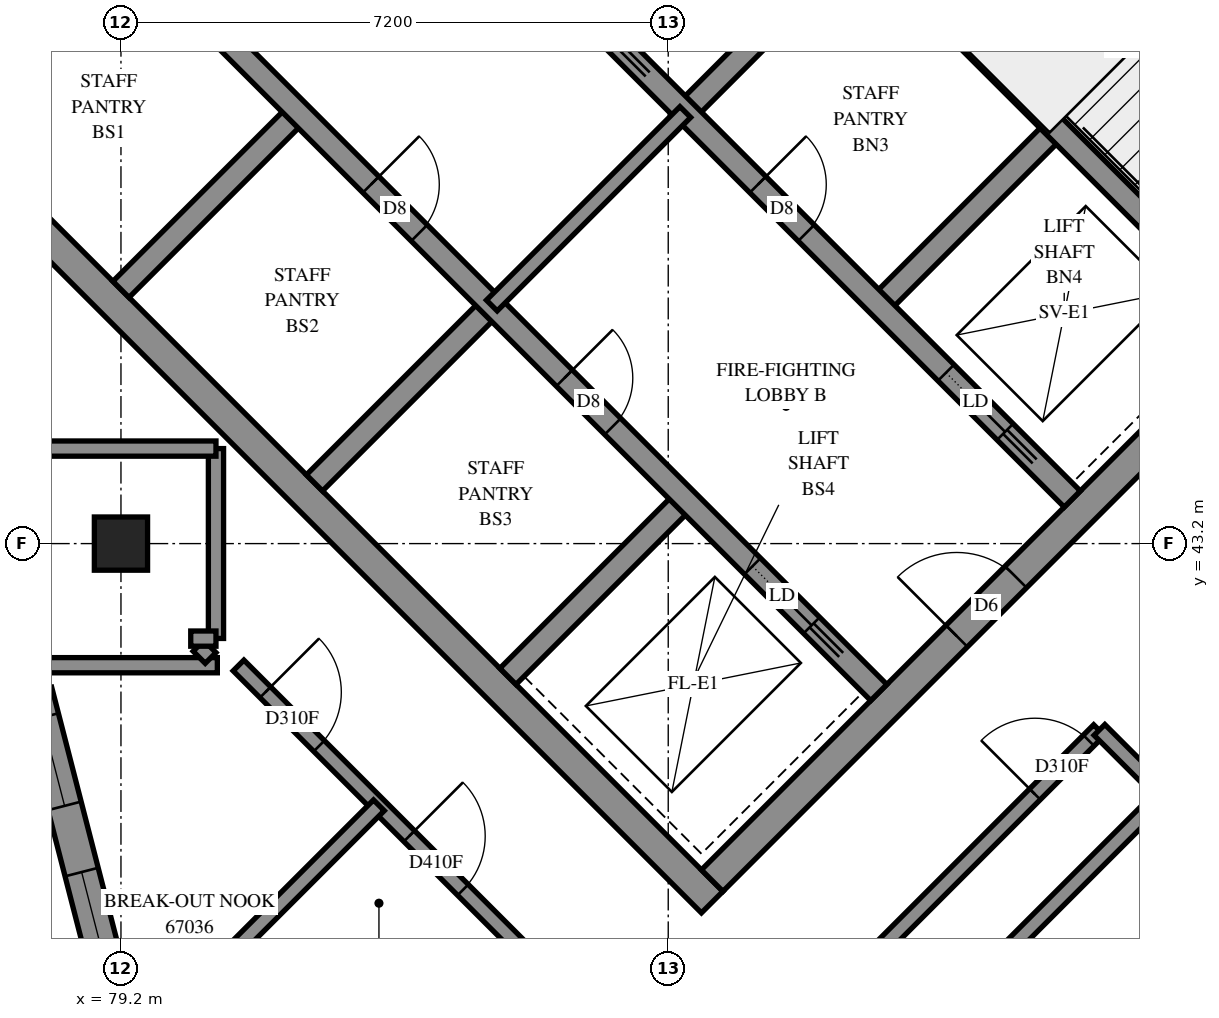
"""IFC4 building model, lengths in metres.
Left out: names, types, materials, properties, quantities, classifications, styles, units other than length and angle.
Written with IfcOpenShell. Run it as: python <this file> out.ifc"""

import sys

from ifc_helpers import new_model, si_unit, direction, frame, frame_2d, origin, origin_2d, place, context, subcontext, project, spatial, polyline, rectangle, outline, extrude, element, fill, save


model = new_model("IFC4")
c1 = context("Model", 3, precision=1e-05, world=origin(), true_north=direction((0.0, 1.0)))
c2 = subcontext(c1, "Body", "Model", "MODEL_VIEW")
j1 = project(units=[si_unit("LENGTHUNIT", "METRE"), si_unit("PLANEANGLEUNIT", "RADIAN")], contexts=[c1])
p1 = place(None, origin())
s1 = spatial("IfcSite", under=j1, at=p1, CompositionType="ELEMENT")
p2 = place(p1, origin())
s2 = spatial("IfcBuilding", under=s1, at=p2, CompositionType="ELEMENT")
p3 = place(p2, frame((0.0, 0.0, 247.2)))
s3 = spatial("IfcBuildingStorey", under=s2, at=p3, CompositionType="ELEMENT", Elevation=247.2)
p4 = place(p3, frame((79.2, 43.2, 0.0), z_axis=(0.0, 0.0, 1.0), x_axis=(1.0, 0.0, 0.0)))
e1 = element("IfcColumn", 1, at=p4, inside=s3, PredefinedType="COLUMN", context=c2, shape_type="SweptSolid", body=[
    extrude(rectangle(XDim=0.7, YDim=0.7, at=origin_2d()), origin(), (0.0, 0.0, 1.0), 3.1),
])
p5 = place(p3, frame((76.23, 49.231, -0.3), z_axis=(0.0, 0.0, 1.0), x_axis=(0.7071034917, -0.7071100706, 0.0)))
e2 = element("IfcWall", 2, at=p5, inside=s3, PredefinedType="SHEAR", context=c2, shape_type="SweptSolid", body=[
    extrude(rectangle(XDim=15.2, YDim=0.4, at=frame_2d((7.6, 0.0))), origin(), (0.0, 0.0, 1.0), 2.7),
])
p6 = place(p3, frame((86.695, 59.696, -0.3), z_axis=(0.0, 0.0, 1.0), x_axis=(0.7071100706, -0.7071034917, 0.0)))
e3 = element("IfcWall", 3, at=p6, inside=s3, PredefinedType="SHEAR", context=c2, shape_type="SweptSolid", body=[
    extrude(rectangle(XDim=15.2, YDim=0.4, at=frame_2d((7.6, 0.0))), origin(), (0.0, 0.0, 1.0), 2.7),
])
p7 = place(p6, frame((10.4, 0.0, 0.3)))
e4 = element("IfcOpeningElement", 4, at=p7, cuts=e3, PredefinedType="OPENING", context=c2, shape_type="SweptSolid", body=[
    extrude(rectangle(XDim=0.8, YDim=2.1, at=frame_2d((0.4, 1.05))), frame((0.0, 0.21, 0.0), z_axis=(0.0, -1.0, 0.0), x_axis=(1.0, 0.0, 0.0)), (0.0, 0.0, 1.0), 0.42),
])
p8 = place(p3, frame((76.513, 49.231, -0.3), z_axis=(0.0, 0.0, 1.0), x_axis=(0.7071067812, 0.7071067812, 0.0)))
e5 = element("IfcWall", 5, at=p8, inside=s3, PredefinedType="SHEAR", context=c2, shape_type="SweptSolid", body=[
    extrude(rectangle(XDim=14.4, YDim=0.4, at=frame_2d((7.2, 0.0))), origin(), (0.0, 0.0, 1.0), 2.7),
])
p9 = place(p8, frame((4.55, 0.0, 0.3)))
e6 = element("IfcOpeningElement", 6, at=p9, cuts=e5, PredefinedType="OPENING", context=c2, shape_type="SweptSolid", body=[
    extrude(rectangle(XDim=1.1, YDim=2.1, at=frame_2d((0.55, 1.05))), frame((0.0, 0.21, 0.0), z_axis=(0.0, -1.0, 0.0), x_axis=(1.0, 0.0, 0.0)), (0.0, 0.0, 1.0), 0.42),
])
p10 = place(p8, frame((11.35, 0.0, 0.3)))
e7 = element("IfcOpeningElement", 7, at=p10, cuts=e5, PredefinedType="OPENING", context=c2, shape_type="SweptSolid", body=[
    extrude(rectangle(XDim=1.1, YDim=2.1, at=frame_2d((0.55, 1.05))), frame((0.0, 0.21, 0.0), z_axis=(0.0, -1.0, 0.0), x_axis=(1.0, 0.0, 0.0)), (0.0, 0.0, 1.0), 0.42),
])
p11 = place(p3, frame((86.978, 38.766, -0.3), z_axis=(0.0, 0.0, 1.0), x_axis=(0.7071067812, 0.7071067812, 0.0)))
e8 = element("IfcWall", 8, at=p11, inside=s3, PredefinedType="SHEAR", context=c2, shape_type="SweptSolid", body=[
    extrude(rectangle(XDim=14.4, YDim=0.4, at=frame_2d((7.2, 0.0))), origin(), (0.0, 0.0, 1.0), 2.7),
])
p12 = place(p11, frame((4.55, 0.0, 0.3)))
e9 = element("IfcOpeningElement", 9, at=p12, cuts=e8, PredefinedType="OPENING", context=c2, shape_type="SweptSolid", body=[
    extrude(rectangle(XDim=1.1, YDim=2.1, at=frame_2d((0.55, 1.05))), frame((0.0, 0.21, 0.0), z_axis=(0.0, -1.0, 0.0), x_axis=(1.0, 0.0, 0.0)), (0.0, 0.0, 1.0), 0.42),
])
p13 = place(p11, frame((11.35, 0.0, 0.3)))
e10 = element("IfcOpeningElement", 10, at=p13, cuts=e8, PredefinedType="OPENING", context=c2, shape_type="SweptSolid", body=[
    extrude(rectangle(XDim=1.1, YDim=2.1, at=frame_2d((0.55, 1.05))), frame((0.0, 0.21, 0.0), z_axis=(0.0, -1.0, 0.0), x_axis=(1.0, 0.0, 0.0)), (0.0, 0.0, 1.0), 0.42),
])
p14 = place(p3, frame((79.2, 46.544, 0.0), z_axis=(0.0, 0.0, 1.0), x_axis=(0.7071219326, 0.7070916295, 0.0)))
e11 = element("IfcWall", 11, at=p14, inside=s3, PredefinedType="SOLIDWALL", context=c2, shape_type="SweptSolid", body=[
    extrude(rectangle(XDim=3.3, YDim=0.3, at=frame_2d((1.65, 0.0))), origin(), (0.0, 0.0, 1.0), 3.1),
])
p15 = place(p3, frame((81.746, 43.999, 0.0), z_axis=(0.0, 0.0, 1.0), x_axis=(0.7071067812, 0.7071067812, 0.0)))
e12 = element("IfcWall", 12, at=p15, inside=s3, PredefinedType="SOLIDWALL", context=c2, shape_type="SweptSolid", body=[
    extrude(rectangle(XDim=3.3, YDim=0.3, at=frame_2d((1.65, 0.0))), origin(), (0.0, 0.0, 1.0), 3.1),
])
p16 = place(p3, frame((86.625, 48.878, 0.0), z_axis=(0.0, 0.0, 1.0), x_axis=(0.7071067812, 0.7071067812, 0.0)))
e13 = element("IfcWall", 13, at=p16, inside=s3, PredefinedType="SOLIDWALL", context=c2, shape_type="SweptSolid", body=[
    extrude(rectangle(XDim=3.3, YDim=0.3, at=frame_2d((1.65, 0.0))), origin(), (0.0, 0.0, 1.0), 3.1),
])
p17 = place(p3, frame((84.291, 41.453, 0.0), z_axis=(0.0, 0.0, 1.0), x_axis=(0.7071067812, 0.7071067812, 0.0)))
e14 = element("IfcWall", 14, at=p17, inside=s3, PredefinedType="SOLIDWALL", context=c2, shape_type="SweptSolid", body=[
    extrude(rectangle(XDim=3.3, YDim=0.3, at=frame_2d((1.65, 0.0))), origin(), (0.0, 0.0, 1.0), 3.1),
])
p18 = place(p3, frame((89.17, 46.332, 0.0), z_axis=(0.0, 0.0, 1.0), x_axis=(0.7071067812, 0.7071067812, 0.0)))
e15 = element("IfcWall", 15, at=p18, inside=s3, PredefinedType="SOLIDWALL", context=c2, shape_type="SweptSolid", body=[
    extrude(rectangle(XDim=3.3, YDim=0.3, at=frame_2d((1.65, 0.0))), origin(), (0.0, 0.0, 1.0), 3.1),
])
p19 = place(p3, frame((78.988, 51.423, 0.0), z_axis=(0.0, 0.0, 1.0), x_axis=(0.7071067812, -0.7071067812, 0.0)))
e16 = element("IfcWall", 16, at=p19, inside=s3, PredefinedType="SOLIDWALL", context=c2, shape_type="SweptSolid", body=[
    extrude(rectangle(XDim=14.4, YDim=0.3, at=frame_2d((7.2, 0.0))), origin(), (0.0, 0.0, 1.0), 3.1),
])
p20 = place(p19, frame((1.35, 0.0, 0.0)))
e17 = element("IfcOpeningElement", 17, at=p20, cuts=e16, PredefinedType="OPENING", context=c2, shape_type="SweptSolid", body=[
    extrude(rectangle(XDim=0.9, YDim=2.1, at=frame_2d((0.45, 1.05))), frame((0.0, 0.16, 0.0), z_axis=(0.0, -1.0, 0.0), x_axis=(1.0, 0.0, 0.0)), (0.0, 0.0, 1.0), 0.32),
])
p21 = place(p19, frame((4.95, 0.0, 0.0)))
e18 = element("IfcOpeningElement", 18, at=p21, cuts=e16, PredefinedType="OPENING", context=c2, shape_type="SweptSolid", body=[
    extrude(rectangle(XDim=0.9, YDim=2.1, at=frame_2d((0.45, 1.05))), frame((0.0, 0.16, 0.0), z_axis=(0.0, -1.0, 0.0), x_axis=(1.0, 0.0, 0.0)), (0.0, 0.0, 1.0), 0.32),
])
p22 = place(p19, frame((8.55, 0.0, 0.0)))
e19 = element("IfcOpeningElement", 19, at=p22, cuts=e16, PredefinedType="OPENING", context=c2, shape_type="SweptSolid", body=[
    extrude(rectangle(XDim=0.9, YDim=2.1, at=frame_2d((0.45, 1.05))), frame((0.0, 0.16, 0.0), z_axis=(0.0, -1.0, 0.0), x_axis=(1.0, 0.0, 0.0)), (0.0, 0.0, 1.0), 0.32),
])
p23 = place(p19, frame((12.05, 0.0, 0.0)))
e20 = element("IfcOpeningElement", 20, at=p23, cuts=e16, PredefinedType="OPENING", context=c2, shape_type="SweptSolid", body=[
    extrude(rectangle(XDim=1.1, YDim=2.1, at=frame_2d((0.55, 1.05))), frame((0.0, 0.16, 0.0), z_axis=(0.0, -1.0, 0.0), x_axis=(1.0, 0.0, 0.0)), (0.0, 0.0, 1.0), 0.32),
])
p24 = place(p3, frame((81.534, 53.969, 0.0), z_axis=(0.0, 0.0, 1.0), x_axis=(0.707103309, -0.7071102534, 0.0)))
e21 = element("IfcWall", 21, at=p24, inside=s3, PredefinedType="SOLIDWALL", context=c2, shape_type="SweptSolid", body=[
    extrude(rectangle(XDim=14.4, YDim=0.3, at=frame_2d((7.2, 0.0))), origin(), (0.0, 0.0, 1.0), 3.1),
])
p25 = place(p24, frame((8.55, 0.0, 0.0)))
e22 = element("IfcOpeningElement", 22, at=p25, cuts=e21, PredefinedType="OPENING", context=c2, shape_type="SweptSolid", body=[
    extrude(rectangle(XDim=0.9, YDim=2.1, at=frame_2d((0.45, 1.05))), frame((0.0, 0.16, 0.0), z_axis=(0.0, -1.0, 0.0), x_axis=(1.0, 0.0, 0.0)), (0.0, 0.0, 1.0), 0.32),
])
p26 = place(p24, frame((1.25, 0.0, 0.0)))
e23 = element("IfcOpeningElement", 23, at=p26, cuts=e21, PredefinedType="OPENING", context=c2, shape_type="SweptSolid", body=[
    extrude(rectangle(XDim=1.1, YDim=2.1, at=frame_2d((0.55, 1.05))), frame((0.0, 0.16, 0.0), z_axis=(0.0, -1.0, 0.0), x_axis=(1.0, 0.0, 0.0)), (0.0, 0.0, 1.0), 0.32),
])
p27 = place(p24, frame((4.85, 0.0, 0.0)))
e24 = element("IfcOpeningElement", 24, at=p27, cuts=e21, PredefinedType="OPENING", context=c2, shape_type="SweptSolid", body=[
    extrude(rectangle(XDim=1.1, YDim=2.1, at=frame_2d((0.55, 1.05))), frame((0.0, 0.16, 0.0), z_axis=(0.0, -1.0, 0.0), x_axis=(1.0, 0.0, 0.0)), (0.0, 0.0, 1.0), 0.32),
])
p28 = place(p24, frame((12.05, 0.0, 0.0)))
e25 = element("IfcOpeningElement", 25, at=p28, cuts=e21, PredefinedType="OPENING", context=c2, shape_type="SweptSolid", body=[
    extrude(rectangle(XDim=1.1, YDim=2.1, at=frame_2d((0.55, 1.05))), frame((0.0, 0.16, 0.0), z_axis=(0.0, -1.0, 0.0), x_axis=(1.0, 0.0, 0.0)), (0.0, 0.0, 1.0), 0.32),
])
p29 = place(p3, frame((88.958, 51.211, 0.0), z_axis=(0.0, 0.0, 1.0), x_axis=(0.7070998367, -0.7071137256, 0.0)))
e26 = element("IfcWall", 26, at=p29, inside=s3, PredefinedType="SOLIDWALL", context=c2, shape_type="SweptSolid", body=[
    extrude(rectangle(XDim=7.2, YDim=0.3, at=frame_2d((3.6, 0.0))), origin(), (0.0, 0.0, 1.0), 3.1),
])
p30 = place(p3, frame((78.071, 41.255, 0.0), z_axis=(0.0, 0.0, 1.0), x_axis=(0.2493659813, -0.9684093181, 0.0)))
e27 = element("IfcWall", 27, at=p30, inside=s3, PredefinedType="SOLIDWALL", context=c2, shape_type="SweptSolid", body=[
    extrude(outline(polyline([(0.133, -0.225), (4.853, -0.225), (4.598, 0.225), (-0.133, 0.225), (0.133, -0.225)])), origin(), (0.0, 0.0, 1.0), 3.1),
])
p31 = place(p30, frame((0.354, 0.0, 0.45)))
e28 = element("IfcOpeningElement", 28, at=p31, cuts=e27, PredefinedType="OPENING", context=c2, shape_type="SweptSolid", body=[
    extrude(rectangle(XDim=1.2, YDim=2.55, at=frame_2d((0.6, 1.275))), frame((0.0, 0.235, 0.0), z_axis=(0.0, -1.0, 0.0), x_axis=(1.0, 0.0, 0.0)), (0.0, 0.0, 1.0), 0.47),
])
p32 = place(p30, frame((2.453, 0.0, 0.45)))
e29 = element("IfcOpeningElement", 29, at=p32, cuts=e27, PredefinedType="OPENING", context=c2, shape_type="SweptSolid", body=[
    extrude(rectangle(XDim=1.2, YDim=2.55, at=frame_2d((0.6, 1.275))), frame((0.0, 0.235, 0.0), z_axis=(0.0, -1.0, 0.0), x_axis=(1.0, 0.0, 0.0)), (0.0, 0.0, 1.0), 0.47),
])
p33 = place(p3, frame((91.313, 53.354, 0.0), z_axis=(0.0, 0.0, 1.0), x_axis=(0.7071067812, -0.7071067812, 0.0)))
e30 = element("IfcWall", 30, at=p33, inside=s3, PredefinedType="PARTITIONING", context=c2, shape_type="SweptSolid", body=[
    extrude(rectangle(XDim=5.65, YDim=0.15, at=frame_2d((2.825, 0.0))), origin(), (0.0, 0.0, 1.0), 3.1),
])
p34 = place(p3, frame((84.079, 46.332, 0.0), z_axis=(0.0, 0.0, 1.0), x_axis=(0.7071067812, 0.7071067812, 0.0)))
e31 = element("IfcWall", 31, at=p34, inside=s3, PredefinedType="PARTITIONING", context=c2, shape_type="SweptSolid", body=[
    extrude(rectangle(XDim=3.6, YDim=0.2, at=frame_2d((1.8, 0.0))), origin(), (0.0, 0.0, 1.0), 3.1),
])
p35 = place(p3, frame((84.934, 31.915, 0.0), z_axis=(0.0, 0.0, 1.0), x_axis=(0.7071067812, 0.7071067812, 0.0)))
e32 = element("IfcWall", 32, at=p35, inside=s3, PredefinedType="PARTITIONING", context=c2, shape_type="SweptSolid", body=[
    extrude(rectangle(XDim=11.29, YDim=0.2, at=frame_2d((5.645, 0.0))), origin(), (0.0, 0.0, 1.0), 3.1),
])
p36 = place(p3, frame((80.747, 41.597, 0.0), z_axis=(0.0, 0.0, 1.0), x_axis=(0.7071067812, -0.7071067812, 0.0)))
e33 = element("IfcWall", 33, at=p36, inside=s3, PredefinedType="PARTITIONING", context=c2, shape_type="SweptSolid", body=[
    extrude(rectangle(XDim=8.607, YDim=0.2, at=frame_2d((4.303, 0.0))), origin(), (0.0, 0.0, 1.0), 3.1),
])
p37 = place(p36, frame((0.498, 0.0, 0.0)))
e34 = element("IfcOpeningElement", 34, at=p37, cuts=e33, PredefinedType="OPENING", context=c2, shape_type="SweptSolid", body=[
    extrude(rectangle(XDim=1.0, YDim=2.1, at=frame_2d((0.5, 1.05))), frame((0.0, 0.11, 0.0), z_axis=(0.0, -1.0, 0.0), x_axis=(1.0, 0.0, 0.0)), (0.0, 0.0, 1.0), 0.22),
])
p38 = place(p36, frame((3.175, 0.0, 0.0)))
e35 = element("IfcOpeningElement", 35, at=p38, cuts=e33, PredefinedType="OPENING", context=c2, shape_type="SweptSolid", body=[
    extrude(rectangle(XDim=1.0, YDim=2.1, at=frame_2d((0.5, 1.05))), frame((0.0, 0.11, 0.0), z_axis=(0.0, -1.0, 0.0), x_axis=(1.0, 0.0, 0.0)), (0.0, 0.0, 1.0), 0.22),
])
p39 = place(p3, frame((86.836, 35.514, 0.0), z_axis=(0.0, 0.0, 1.0), x_axis=(0.7071067812, 0.7071067812, 0.0)))
e36 = element("IfcWall", 36, at=p39, inside=s3, PredefinedType="PARTITIONING", context=c2, shape_type="SweptSolid", body=[
    extrude(rectangle(XDim=7.399, YDim=0.2, at=frame_2d((3.7, 0.0))), origin(), (0.0, 0.0, 1.0), 3.1),
])
p40 = place(p39, frame((6.207, 0.0, 0.0)))
e37 = element("IfcOpeningElement", 37, at=p40, cuts=e36, PredefinedType="OPENING", context=c2, shape_type="SweptSolid", body=[
    extrude(rectangle(XDim=1.0, YDim=2.1, at=frame_2d((0.5, 1.05))), frame((0.0, 0.11, 0.0), z_axis=(0.0, -1.0, 0.0), x_axis=(1.0, 0.0, 0.0)), (0.0, 0.0, 1.0), 0.22),
])
p41 = place(p3, frame((92.073, 40.749, 0.0), z_axis=(0.0, 0.0, 1.0), x_axis=(0.7071067812, -0.7071067812, 0.0)))
e38 = element("IfcWall", 38, at=p41, inside=s3, PredefinedType="PARTITIONING", context=c2, shape_type="SweptSolid", body=[
    extrude(rectangle(XDim=4.8, YDim=0.2, at=frame_2d((2.4, 0.0))), origin(), (0.0, 0.0, 1.0), 3.1),
])
p42 = place(p41, frame((1.725, 0.0, 0.0)))
e39 = element("IfcOpeningElement", 39, at=p42, cuts=e38, PredefinedType="OPENING", context=c2, shape_type="SweptSolid", body=[
    extrude(rectangle(XDim=1.0, YDim=2.1, at=frame_2d((0.5, 1.05))), frame((0.0, 0.11, 0.0), z_axis=(0.0, -1.0, 0.0), x_axis=(1.0, 0.0, 0.0)), (0.0, 0.0, 1.0), 0.22),
])
p43 = place(p3, frame((79.635, 36.798, 0.0), z_axis=(0.0, 0.0, 1.0), x_axis=(0.7071187313, 0.7070948309, 0.0)))
e40 = element("IfcWall", 40, at=p43, inside=s3, PredefinedType="PARTITIONING", context=c2, shape_type="SweptSolid", body=[
    extrude(rectangle(XDim=4.184, YDim=0.2, at=frame_2d((2.092, 0.0))), origin(), (0.0, 0.0, 1.0), 3.1),
])
p44 = place(p3, frame((77.685, 41.6, 0.0), z_axis=(0.0, 0.0, 1.0), x_axis=(1.0, 0.0, 0.0)))
e41 = element("IfcWall", 41, at=p44, inside=s3, PredefinedType="PARTITIONING", context=c2, shape_type="SweptSolid", body=[
    extrude(rectangle(XDim=2.783, YDim=0.2, at=frame_2d((1.392, 0.0))), origin(), (0.0, 0.0, 1.0), 3.1),
])
for number, where, z_axis, x_axis in (
    (42, (80.45, 41.952, 0.0), (0.0, 0.0, 1.0), (0.0, 1.0, 0.0)),
    (43, (77.952, 44.45, 0.0), (0.0, 0.0, 1.0), (1.0, 0.0, 0.0)),
):
    element("IfcWall", number, at=place(p3, frame(where, z_axis=z_axis, x_axis=x_axis)), inside=s3, PredefinedType="PARTITIONING", context=c2, shape_type="SweptSolid", body=[
        extrude(rectangle(XDim=2.498, YDim=0.2, at=frame_2d((1.249, 0.0))), origin(), (0.0, 0.0, 1.0), 3.1),
    ])
p45 = place(p3, frame((80.221, 41.855, 0.0), z_axis=(0.0, 0.0, 1.0), x_axis=(0.7068844555, -0.707329037, 0.0)))
e44 = element("IfcWall", 44, at=p45, inside=s3, PredefinedType="PARTITIONING", context=c2, shape_type="SweptSolid", body=[
    extrude(rectangle(XDim=0.225, YDim=0.2, at=frame_2d((0.112, 0.0))), origin(), (0.0, 0.0, 1.0), 3.1),
])
p46 = place(p3, frame((80.118, 41.95, 0.0), z_axis=(0.0, 0.0, 1.0), x_axis=(1.0, 0.0, 0.0)))
e45 = element("IfcWall", 45, at=p46, inside=s3, PredefinedType="PARTITIONING", context=c2, shape_type="SweptSolid", body=[
    extrude(rectangle(XDim=0.332, YDim=0.2, at=frame_2d((0.166, 0.0))), origin(), (0.0, 0.0, 1.0), 3.1),
])
p47 = place(p31, origin())
e46 = element("IfcWindow", 46, at=p47, inside=s3, PartitioningType="SINGLE_PANEL", PredefinedType="WINDOW", context=c2, shape_type="SweptSolid", body=[
    extrude(rectangle(XDim=1.2, YDim=2.55, at=frame_2d((0.6, 1.275))), frame((0.0, 0.205, 0.0), z_axis=(0.0, -1.0, 0.0), x_axis=(1.0, 0.0, 0.0)), (0.0, 0.0, 1.0), 0.06),
])
fill(e28, e46)
p48 = place(p32, origin())
e47 = element("IfcWindow", 47, at=p48, inside=s3, PartitioningType="SINGLE_PANEL", PredefinedType="WINDOW", context=c2, shape_type="SweptSolid", body=[
    extrude(rectangle(XDim=1.2, YDim=2.55, at=frame_2d((0.6, 1.275))), frame((0.0, 0.205, 0.0), z_axis=(0.0, -1.0, 0.0), x_axis=(1.0, 0.0, 0.0)), (0.0, 0.0, 1.0), 0.06),
])
fill(e29, e47)
p49 = place(p12, origin())
e48 = element("IfcDoor", 48, at=p49, inside=s3, OperationType="DOUBLE_DOOR_SINGLE_SWING", PredefinedType="DOOR", context=c2, shape_type="SweptSolid", body=[
    extrude(rectangle(XDim=1.1, YDim=2.1, at=frame_2d((0.55, 1.05))), frame((0.0, 0.025, 0.0), z_axis=(0.0, -1.0, 0.0), x_axis=(1.0, 0.0, 0.0)), (0.0, 0.0, 1.0), 0.05),
])
fill(e9, e48)
p50 = place(p21, origin())
e49 = element("IfcDoor", 49, at=p50, inside=s3, OperationType="SINGLE_SWING_LEFT", PredefinedType="DOOR", context=c2, shape_type="SweptSolid", body=[
    extrude(rectangle(XDim=0.9, YDim=2.1, at=frame_2d((0.45, 1.05))), frame((0.0, 0.025, 0.0), z_axis=(0.0, -1.0, 0.0), x_axis=(1.0, 0.0, 0.0)), (0.0, 0.0, 1.0), 0.05),
])
fill(e18, e49)
p51 = place(p22, origin())
e50 = element("IfcDoor", 50, at=p51, inside=s3, OperationType="SINGLE_SWING_LEFT", PredefinedType="DOOR", context=c2, shape_type="SweptSolid", body=[
    extrude(rectangle(XDim=0.9, YDim=2.1, at=frame_2d((0.45, 1.05))), frame((0.0, 0.025, 0.0), z_axis=(0.0, -1.0, 0.0), x_axis=(1.0, 0.0, 0.0)), (0.0, 0.0, 1.0), 0.05),
])
fill(e19, e50)
p52 = place(p25, origin())
e51 = element("IfcDoor", 51, at=p52, inside=s3, OperationType="SINGLE_SWING_LEFT", PredefinedType="DOOR", context=c2, shape_type="SweptSolid", body=[
    extrude(rectangle(XDim=0.9, YDim=2.1, at=frame_2d((0.45, 1.05))), frame((0.0, 0.025, 0.0), z_axis=(0.0, -1.0, 0.0), x_axis=(1.0, 0.0, 0.0)), (0.0, 0.0, 1.0), 0.05),
])
fill(e22, e51)
p53 = place(p23, origin())
e52 = element("IfcDoor", 52, at=p53, inside=s3, OperationType="SLIDING_TO_RIGHT", PredefinedType="DOOR", context=c2, shape_type="SweptSolid", body=[
    extrude(rectangle(XDim=1.1, YDim=2.1, at=frame_2d((0.55, 1.05))), frame((0.0, 0.025, 0.0), z_axis=(0.0, -1.0, 0.0), x_axis=(1.0, 0.0, 0.0)), (0.0, 0.0, 1.0), 0.05),
])
fill(e20, e52)
p54 = place(p28, origin())
e53 = element("IfcDoor", 53, at=p54, inside=s3, OperationType="SLIDING_TO_RIGHT", PredefinedType="DOOR", context=c2, shape_type="SweptSolid", body=[
    extrude(rectangle(XDim=1.1, YDim=2.1, at=frame_2d((0.55, 1.05))), frame((0.0, 0.025, 0.0), z_axis=(0.0, -1.0, 0.0), x_axis=(1.0, 0.0, 0.0)), (0.0, 0.0, 1.0), 0.05),
])
fill(e25, e53)
p55 = place(p37, origin())
e54 = element("IfcDoor", 54, at=p55, inside=s3, OperationType="SINGLE_SWING_RIGHT", PredefinedType="DOOR", context=c2, shape_type="SweptSolid", body=[
    extrude(rectangle(XDim=1.0, YDim=2.1, at=frame_2d((0.5, 1.05))), frame((0.0, 0.025, 0.0), z_axis=(0.0, -1.0, 0.0), x_axis=(1.0, 0.0, 0.0)), (0.0, 0.0, 1.0), 0.05),
])
fill(e34, e54)
p56 = place(p38, origin())
e55 = element("IfcDoor", 55, at=p56, inside=s3, OperationType="SINGLE_SWING_LEFT", PredefinedType="DOOR", context=c2, shape_type="SweptSolid", body=[
    extrude(rectangle(XDim=1.0, YDim=2.1, at=frame_2d((0.5, 1.05))), frame((0.0, 0.025, 0.0), z_axis=(0.0, -1.0, 0.0), x_axis=(1.0, 0.0, 0.0)), (0.0, 0.0, 1.0), 0.05),
])
fill(e35, e55)
p57 = place(p40, origin())
e56 = element("IfcDoor", 56, at=p57, inside=s3, OperationType="SINGLE_SWING_RIGHT", PredefinedType="DOOR", context=c2, shape_type="SweptSolid", body=[
    extrude(rectangle(XDim=1.0, YDim=2.1, at=frame_2d((0.5, 1.05))), frame((0.0, 0.025, 0.0), z_axis=(0.0, -1.0, 0.0), x_axis=(1.0, 0.0, 0.0)), (0.0, 0.0, 1.0), 0.05),
])
fill(e37, e56)
save(model, sys.argv[1])
